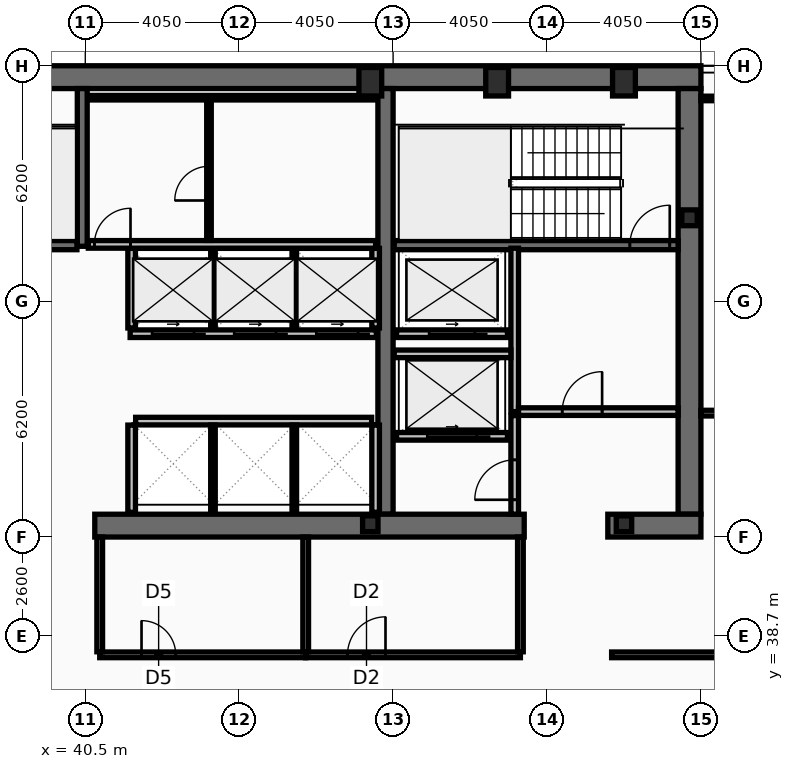
"""IFC4 building model, lengths in metres.
Left out: names, types, materials, properties, quantities, classifications, styles, units other than length and angle.
Written with IfcOpenShell. Run it as: python <this file> out.ifc"""

import sys

from ifc_helpers import new_model, si_unit, direction, frame, frame_2d, origin, origin_2d, place, context, subcontext, project, spatial, rectangle, hollow_rectangle, i_section, extrude, element, fill, save


model = new_model("IFC4")
c1 = context("Model", 3, precision=1e-05, world=origin(), true_north=direction((0.0, 1.0)))
c2 = subcontext(c1, "Body", "Model", "MODEL_VIEW")
j1 = project(units=[si_unit("LENGTHUNIT", "METRE"), si_unit("PLANEANGLEUNIT", "RADIAN")], contexts=[c1])
p1 = place(None, origin())
s1 = spatial("IfcSite", under=j1, at=p1, CompositionType="ELEMENT")
p2 = place(p1, origin())
s2 = spatial("IfcBuilding", under=s1, at=p2, CompositionType="ELEMENT")
p3 = place(p2, frame((0.0, 0.0, 210.2)))
s3 = spatial("IfcBuildingStorey", under=s2, at=p3, CompositionType="ELEMENT", Elevation=210.2)
p4 = place(p3, frame((16.2, 53.4, 0.0), z_axis=(0.0, 0.0, 1.0), x_axis=(1.0, 0.0, 0.0)))
e1 = element("IfcWall", 1, at=p4, inside=s3, PredefinedType="SHEAR", context=c2, shape_type="SweptSolid", body=[
    extrude(rectangle(XDim=40.5, YDim=0.6, at=frame_2d((20.25, 0.0))), origin(), (0.0, 0.0, 1.0), 3.44),
])
p5 = place(p3, frame((56.4, 53.1, 0.0), z_axis=(0.0, 0.0, 1.0), x_axis=(0.0, -1.0, 0.0)))
e2 = element("IfcWall", 2, at=p5, inside=s3, PredefinedType="SHEAR", context=c2, shape_type="SweptSolid", body=[
    extrude(rectangle(XDim=11.2, YDim=0.6, at=frame_2d((5.6, 0.0))), origin(), (0.0, 0.0, 1.0), 3.44),
])
p6 = place(p3, frame((48.4, 41.9, 0.0), z_axis=(0.0, 0.0, 1.0), x_axis=(0.0, 1.0, 0.0)))
e3 = element("IfcWall", 3, at=p6, inside=s3, PredefinedType="SHEAR", context=c2, shape_type="SweptSolid", body=[
    extrude(rectangle(XDim=11.2, YDim=0.4, at=frame_2d((5.6, 0.0))), origin(), (0.0, 0.0, 1.0), 3.44),
])
p7 = place(p3, frame((52.05, 41.6, 0.0), z_axis=(0.0, 0.0, 1.0), x_axis=(-1.0, 0.0, 0.0)))
e4 = element("IfcWall", 4, at=p7, inside=s3, PredefinedType="SHEAR", context=c2, shape_type="SweptSolid", body=[
    extrude(rectangle(XDim=11.3, YDim=0.6, at=frame_2d((5.65, 0.0))), origin(), (0.0, 0.0, 1.0), 3.44),
])
p8 = place(p3, frame((56.7, 41.6, 0.0), z_axis=(0.0, 0.0, 1.0), x_axis=(-1.0, 0.0, 0.0)))
e5 = element("IfcWall", 5, at=p8, inside=s3, PredefinedType="SHEAR", context=c2, shape_type="SweptSolid", body=[
    extrude(rectangle(XDim=2.45, YDim=0.6, at=frame_2d((1.225, 0.0))), origin(), (0.0, 0.0, 1.0), 3.44),
])
p9 = place(p3, frame((40.42, 48.95, 0.0), z_axis=(0.0, 0.0, 1.0), x_axis=(0.0, 1.0, 0.0)))
e6 = element("IfcWall", 6, at=p9, inside=s3, PredefinedType="SHEAR", context=c2, shape_type="SweptSolid", body=[
    extrude(rectangle(XDim=4.15, YDim=0.26, at=frame_2d((2.075, 0.0))), origin(), (0.0, 0.0, 1.0), 3.44),
])
p10 = place(p3, frame((48.63, 48.98, 0.0), z_axis=(0.0, 0.0, 1.0), x_axis=(1.0, 0.0, 0.0)))
e7 = element("IfcWall", 7, at=p10, inside=s3, PredefinedType="SHEAR", context=c2, shape_type="SweptSolid", body=[
    extrude(rectangle(XDim=7.47, YDim=0.24, at=frame_2d((3.735, 0.0))), origin(), (0.0, 0.0, 1.0), 3.44),
])
p11 = place(p10, frame((6.2, 0.0, 0.0)))
e8 = element("IfcOpeningElement", 8, at=p11, cuts=e7, PredefinedType="OPENING", context=c2, shape_type="SweptSolid", body=[
    extrude(rectangle(XDim=1.05, YDim=2.15, at=frame_2d((0.525, 1.075))), frame((0.0, 0.13, 0.0), z_axis=(0.0, -1.0, 0.0), x_axis=(1.0, 0.0, 0.0)), (0.0, 0.0, 1.0), 0.26),
])
p12 = place(p3, frame((32.72, 48.98, 0.0), z_axis=(0.0, 0.0, 1.0), x_axis=(1.0, 0.0, 0.0)))
e9 = element("IfcWall", 9, at=p12, inside=s3, PredefinedType="SHEAR", context=c2, shape_type="SweptSolid", body=[
    extrude(rectangle(XDim=7.56, YDim=0.24, at=frame_2d((3.78, 0.0))), origin(), (0.0, 0.0, 1.0), 3.44),
])
p13 = place(p12, frame((0.22, 0.0, 0.0)))
e10 = element("IfcOpeningElement", 10, at=p13, cuts=e9, PredefinedType="OPENING", context=c2, shape_type="SweptSolid", body=[
    extrude(rectangle(XDim=1.05, YDim=2.15, at=frame_2d((0.525, 1.075))), frame((0.0, 0.13, 0.0), z_axis=(0.0, -1.0, 0.0), x_axis=(1.0, 0.0, 0.0)), (0.0, 0.0, 1.0), 0.26),
])
for number, where, z_axis, x_axis in (
    (11, (48.0, 53.28, 0.0), (0.0, 0.0, 1.0), (1.0, 0.0, 0.0)),
    (12, (51.337, 53.28, 0.0), (0.0, 0.0, 1.0), (1.0, 0.0, 0.0)),
    (13, (54.675, 53.28, 0.0), (0.0, 0.0, 1.0), (1.0, 0.0, 0.0)),
):
    element("IfcColumn", number, at=place(p3, frame(where, z_axis=z_axis, x_axis=x_axis)), inside=s3, PredefinedType="COLUMN", context=c2, shape_type="SweptSolid", body=[
        extrude(hollow_rectangle(XDim=0.6, YDim=0.75, WallThickness=0.045, at=origin_2d()), origin(), (0.0, 0.0, 1.0), 3.6),
    ])
for number, where, z_axis, x_axis in (
    (14, (56.4, 49.7, 0.0), (0.0, 0.0, 1.0), (1.0, 0.0, 0.0)),
    (15, (48.0, 41.65, 0.0), (0.0, 0.0, 1.0), (1.0, 0.0, 0.0)),
    (16, (54.675, 41.65, 0.0), (0.0, 0.0, 1.0), (1.0, 0.0, 0.0)),
):
    element("IfcColumn", number, at=place(p3, frame(where, z_axis=z_axis, x_axis=x_axis)), inside=s3, PredefinedType="COLUMN", context=c2, shape_type="SweptSolid", body=[
        extrude(i_section(OverallWidth=0.406, OverallDepth=0.416, WebThickness=0.03, FlangeThickness=0.048, at=origin_2d()), origin(), (0.0, 0.0, 1.0), 3.6),
    ])
p14 = place(p3, frame((51.61, 43.95, 0.0), z_axis=(0.0, 0.0, 1.0), x_axis=(-1.0, 0.0, 0.0)))
e17 = element("IfcWall", 17, at=p14, inside=s3, PredefinedType="PARTITIONING", context=c2, shape_type="SweptSolid", body=[
    extrude(rectangle(XDim=2.92, YDim=0.2, at=frame_2d((1.46, 0.0))), origin(), (0.0, 0.0, 1.0), 3.44),
])
p15 = place(p14, frame((0.81, 0.0, 0.0)))
e18 = element("IfcOpeningElement", 18, at=p15, cuts=e17, PredefinedType="OPENING", context=c2, shape_type="SweptSolid", body=[
    extrude(rectangle(XDim=1.3, YDim=2.18, at=frame_2d((0.65, 1.09))), frame((0.0, 0.11, 0.0), z_axis=(0.0, -1.0, 0.0), x_axis=(1.0, 0.0, 0.0)), (0.0, 0.0, 1.0), 0.22),
])
p16 = place(p3, frame((51.61, 46.65, 0.0), z_axis=(0.0, 0.0, 1.0), x_axis=(-1.0, 0.0, 0.0)))
e19 = element("IfcWall", 19, at=p16, inside=s3, PredefinedType="PARTITIONING", context=c2, shape_type="SweptSolid", body=[
    extrude(rectangle(XDim=2.92, YDim=0.2, at=frame_2d((1.46, 0.0))), origin(), (0.0, 0.0, 1.0), 3.44),
])
p17 = place(p16, frame((0.86, 0.0, 0.0)))
e20 = element("IfcOpeningElement", 20, at=p17, cuts=e19, PredefinedType="OPENING", context=c2, shape_type="SweptSolid", body=[
    extrude(rectangle(XDim=1.2, YDim=2.18, at=frame_2d((0.6, 1.09))), frame((0.0, 0.11, 0.0), z_axis=(0.0, -1.0, 0.0), x_axis=(1.0, 0.0, 0.0)), (0.0, 0.0, 1.0), 0.22),
])
p18 = place(p3, frame((48.16, 46.65, 0.0), z_axis=(0.0, 0.0, 1.0), x_axis=(-1.0, 0.0, 0.0)))
e21 = element("IfcWall", 21, at=p18, inside=s3, PredefinedType="PARTITIONING", context=c2, shape_type="SweptSolid", body=[
    extrude(rectangle(XDim=6.48, YDim=0.2, at=frame_2d((3.24, 0.0))), origin(), (0.0, 0.0, 1.0), 3.44),
])
p19 = place(p18, frame((4.8, 0.0, 0.0)))
e22 = element("IfcOpeningElement", 22, at=p19, cuts=e21, PredefinedType="OPENING", context=c2, shape_type="SweptSolid", body=[
    extrude(rectangle(XDim=1.1, YDim=2.18, at=frame_2d((0.55, 1.09))), frame((0.0, 0.11, 0.0), z_axis=(0.0, -1.0, 0.0), x_axis=(1.0, 0.0, 0.0)), (0.0, 0.0, 1.0), 0.22),
])
p20 = place(p18, frame((2.64, 0.0, 0.0)))
e23 = element("IfcOpeningElement", 23, at=p20, cuts=e21, PredefinedType="OPENING", context=c2, shape_type="SweptSolid", body=[
    extrude(rectangle(XDim=1.1, YDim=2.18, at=frame_2d((0.55, 1.09))), frame((0.0, 0.11, 0.0), z_axis=(0.0, -1.0, 0.0), x_axis=(1.0, 0.0, 0.0)), (0.0, 0.0, 1.0), 0.22),
])
p21 = place(p18, frame((0.48, 0.0, 0.0)))
e24 = element("IfcOpeningElement", 24, at=p21, cuts=e21, PredefinedType="OPENING", context=c2, shape_type="SweptSolid", body=[
    extrude(rectangle(XDim=1.1, YDim=2.18, at=frame_2d((0.55, 1.09))), frame((0.0, 0.11, 0.0), z_axis=(0.0, -1.0, 0.0), x_axis=(1.0, 0.0, 0.0)), (0.0, 0.0, 1.0), 0.22),
])
p22 = place(p3, frame((51.8, 44.6, 0.0), z_axis=(0.0, 0.0, 1.0), x_axis=(0.0, 1.0, 0.0)))
e25 = element("IfcWall", 25, at=p22, inside=s3, PredefinedType="PARTITIONING", context=c2, shape_type="SweptSolid", body=[
    extrude(rectangle(XDim=4.3, YDim=0.2, at=frame_2d((2.15, 0.0))), origin(), (0.0, 0.0, 1.0), 3.44),
])
p23 = place(p3, frame((51.9, 44.6, 0.0), z_axis=(0.0, 0.0, 1.0), x_axis=(1.0, 0.0, 0.0)))
e26 = element("IfcWall", 26, at=p23, inside=s3, PredefinedType="PARTITIONING", context=c2, shape_type="SweptSolid", body=[
    extrude(rectangle(XDim=4.2, YDim=0.2, at=frame_2d((2.1, 0.0))), origin(), (0.0, 0.0, 1.0), 3.44),
])
p24 = place(p23, frame((1.15, 0.0, 0.0)))
e27 = element("IfcOpeningElement", 27, at=p24, cuts=e26, PredefinedType="OPENING", context=c2, shape_type="SweptSolid", body=[
    extrude(rectangle(XDim=1.05, YDim=2.15, at=frame_2d((0.525, 1.075))), frame((0.0, 0.11, 0.0), z_axis=(0.0, -1.0, 0.0), x_axis=(1.0, 0.0, 0.0)), (0.0, 0.0, 1.0), 0.22),
])
p25 = place(p3, frame((48.63, 46.12, 0.0), z_axis=(0.0, 0.0, 1.0), x_axis=(1.0, 0.0, 0.0)))
e28 = element("IfcWall", 28, at=p25, inside=s3, PredefinedType="PARTITIONING", context=c2, shape_type="SweptSolid", body=[
    extrude(rectangle(XDim=3.07, YDim=0.2, at=frame_2d((1.535, 0.0))), origin(), (0.0, 0.0, 1.0), 3.44),
])
p26 = place(p3, frame((51.8, 41.9, 0.0), z_axis=(0.0, 0.0, 1.0), x_axis=(0.0, 1.0, 0.0)))
e29 = element("IfcWall", 29, at=p26, inside=s3, PredefinedType="PARTITIONING", context=c2, shape_type="SweptSolid", body=[
    extrude(rectangle(XDim=2.595, YDim=0.2, at=frame_2d((1.298, 0.0))), origin(), (0.0, 0.0, 1.0), 3.44),
])
p27 = place(p26, frame((0.38, 0.0, 0.0)))
e30 = element("IfcOpeningElement", 30, at=p27, cuts=e29, PredefinedType="OPENING", context=c2, shape_type="SweptSolid", body=[
    extrude(rectangle(XDim=1.05, YDim=2.15, at=frame_2d((0.525, 1.075))), frame((0.0, 0.11, 0.0), z_axis=(0.0, -1.0, 0.0), x_axis=(1.0, 0.0, 0.0)), (0.0, 0.0, 1.0), 0.22),
])
for number, where, z_axis, x_axis in (
    (31, (41.72, 46.8, 0.0), (0.0, 0.0, 1.0), (0.0, 1.0, 0.0)),
    (32, (48.14, 46.8, 0.0), (0.0, 0.0, 1.0), (0.0, 1.0, 0.0)),
):
    element("IfcWall", number, at=place(p3, frame(where, z_axis=z_axis, x_axis=x_axis)), inside=s3, PredefinedType="PARTITIONING", context=c2, shape_type="SweptSolid", body=[
        extrude(rectangle(XDim=2.095, YDim=0.2, at=frame_2d((1.047, 0.0))), origin(), (0.0, 0.0, 1.0), 3.44),
    ])
for number, where, z_axis, x_axis in (
    (33, (43.86, 46.8, 0.0), (0.0, 0.0, 1.0), (0.0, 1.0, 0.0)),
    (34, (46.0, 46.8, 0.0), (0.0, 0.0, 1.0), (0.0, 1.0, 0.0)),
):
    element("IfcWall", number, at=place(p3, frame(where, z_axis=z_axis, x_axis=x_axis)), inside=s3, PredefinedType="PARTITIONING", context=c2, shape_type="SweptSolid", body=[
        extrude(rectangle(XDim=2.095, YDim=0.12, at=frame_2d((1.047, 0.0))), origin(), (0.0, 0.0, 1.0), 3.44),
    ])
p28 = place(p3, frame((41.825, 44.35, 0.0), z_axis=(0.0, 0.0, 1.0), x_axis=(1.0, 0.0, 0.0)))
e35 = element("IfcWall", 35, at=p28, inside=s3, PredefinedType="PARTITIONING", context=c2, shape_type="SweptSolid", body=[
    extrude(rectangle(XDim=6.21, YDim=0.2, at=frame_2d((3.105, 0.0))), origin(), (0.0, 0.0, 1.0), 3.44),
])
for number, where, z_axis, x_axis in (
    (36, (41.72, 41.95, 0.0), (0.0, 0.0, 1.0), (0.0, 1.0, 0.0)),
    (37, (48.14, 41.95, 0.0), (0.0, 0.0, 1.0), (0.0, 1.0, 0.0)),
):
    element("IfcWall", number, at=place(p3, frame(where, z_axis=z_axis, x_axis=x_axis)), inside=s3, PredefinedType="PARTITIONING", context=c2, shape_type="SweptSolid", body=[
        extrude(rectangle(XDim=2.295, YDim=0.2, at=frame_2d((1.147, 0.0))), origin(), (0.0, 0.0, 1.0), 3.44),
    ])
for number, where, z_axis, x_axis in (
    (38, (43.86, 41.95, 0.0), (0.0, 0.0, 1.0), (0.0, 1.0, 0.0)),
    (39, (46.0, 41.95, 0.0), (0.0, 0.0, 1.0), (0.0, 1.0, 0.0)),
):
    element("IfcWall", number, at=place(p3, frame(where, z_axis=z_axis, x_axis=x_axis)), inside=s3, PredefinedType="PARTITIONING", context=c2, shape_type="SweptSolid", body=[
        extrude(rectangle(XDim=2.295, YDim=0.12, at=frame_2d((1.147, 0.0))), origin(), (0.0, 0.0, 1.0), 3.44),
    ])
p29 = place(p3, frame((40.58, 52.86, 0.0), z_axis=(0.0, 0.0, 1.0), x_axis=(1.0, 0.0, 0.0)))
e40 = element("IfcWall", 40, at=p29, inside=s3, PredefinedType="PARTITIONING", context=c2, shape_type="SweptSolid", body=[
    extrude(rectangle(XDim=7.56, YDim=0.12, at=frame_2d((3.78, 0.0))), origin(), (0.0, 0.0, 1.0), 3.44),
])
p30 = place(p3, frame((40.58, 49.0, 0.0), z_axis=(0.0, 0.0, 1.0), x_axis=(1.0, 0.0, 0.0)))
e41 = element("IfcWall", 41, at=p30, inside=s3, PredefinedType="PARTITIONING", context=c2, shape_type="SweptSolid", body=[
    extrude(rectangle(XDim=7.56, YDim=0.2, at=frame_2d((3.78, 0.0))), origin(), (0.0, 0.0, 1.0), 3.44),
])
p31 = place(p30, frame((0.16, 0.0, 0.0)))
e42 = element("IfcOpeningElement", 42, at=p31, cuts=e41, PredefinedType="OPENING", context=c2, shape_type="SweptSolid", body=[
    extrude(rectangle(XDim=0.95, YDim=2.1, at=frame_2d((0.475, 1.05))), frame((0.0, 0.11, 0.0), z_axis=(0.0, -1.0, 0.0), x_axis=(1.0, 0.0, 0.0)), (0.0, 0.0, 1.0), 0.22),
])
p32 = place(p3, frame((43.755, 49.105, 0.0), z_axis=(0.0, 0.0, 1.0), x_axis=(0.0, 1.0, 0.0)))
e43 = element("IfcWall", 43, at=p32, inside=s3, PredefinedType="PARTITIONING", context=c2, shape_type="SweptSolid", body=[
    extrude(rectangle(XDim=3.69, YDim=0.12, at=frame_2d((1.845, 0.0))), origin(), (0.0, 0.0, 1.0), 3.44),
])
p33 = place(p32, frame((1.05, 0.0, 0.0)))
e44 = element("IfcOpeningElement", 44, at=p33, cuts=e43, PredefinedType="OPENING", context=c2, shape_type="SweptSolid", body=[
    extrude(rectangle(XDim=0.9, YDim=2.05, at=frame_2d((0.45, 1.025))), frame((0.0, 0.07, 0.0), z_axis=(0.0, -1.0, 0.0), x_axis=(1.0, 0.0, 0.0)), (0.0, 0.0, 1.0), 0.14),
])
p34 = place(p3, frame((40.88, 38.2, 0.0), z_axis=(0.0, 0.0, 1.0), x_axis=(1.0, 0.0, 0.0)))
e45 = element("IfcWall", 45, at=p34, inside=s3, PredefinedType="PARTITIONING", context=c2, shape_type="SweptSolid", body=[
    extrude(rectangle(XDim=5.42, YDim=0.15, at=frame_2d((2.71, 0.0))), origin(), (0.0, 0.0, 1.0), 2.73),
])
p35 = place(p34, frame((1.1, 0.0, 0.0)))
e46 = element("IfcOpeningElement", 46, at=p35, cuts=e45, PredefinedType="OPENING", context=c2, shape_type="SweptSolid", body=[
    extrude(rectangle(XDim=0.9, YDim=2.05, at=frame_2d((0.45, 1.025))), frame((0.0, 0.085, 0.0), z_axis=(0.0, -1.0, 0.0), x_axis=(1.0, 0.0, 0.0)), (0.0, 0.0, 1.0), 0.17),
])
p36 = place(p3, frame((46.3, 38.2, 0.0), z_axis=(0.0, 0.0, 1.0), x_axis=(1.0, 0.0, 0.0)))
e47 = element("IfcWall", 47, at=p36, inside=s3, PredefinedType="PARTITIONING", context=c2, shape_type="SweptSolid", body=[
    extrude(rectangle(XDim=5.65, YDim=0.15, at=frame_2d((2.825, 0.0))), origin(), (0.0, 0.0, 1.0), 2.73),
])
p37 = place(p36, frame((1.1, 0.0, 0.0)))
e48 = element("IfcOpeningElement", 48, at=p37, cuts=e47, PredefinedType="OPENING", context=c2, shape_type="SweptSolid", body=[
    extrude(rectangle(XDim=1.0, YDim=2.05, at=frame_2d((0.5, 1.025))), frame((0.0, 0.085, 0.0), z_axis=(0.0, -1.0, 0.0), x_axis=(1.0, 0.0, 0.0)), (0.0, 0.0, 1.0), 0.17),
])
for number, where, z_axis, x_axis in (
    (49, (40.88, 38.28, 0.0), (0.0, 0.0, 1.0), (0.0, 1.0, 0.0)),
    (50, (46.3, 38.28, 0.0), (0.0, 0.0, 1.0), (0.0, 1.0, 0.0)),
    (51, (51.95, 38.28, 0.0), (0.0, 0.0, 1.0), (0.0, 1.0, 0.0)),
):
    element("IfcWall", number, at=place(p3, frame(where, z_axis=z_axis, x_axis=x_axis)), inside=s3, PredefinedType="PARTITIONING", context=c2, shape_type="SweptSolid", body=[
        extrude(rectangle(XDim=3.02, YDim=0.15, at=frame_2d((1.51, 0.0))), origin(), (0.0, 0.0, 1.0), 3.44),
    ])
p38 = place(p3, frame((54.35, 38.2, 0.0), z_axis=(0.0, 0.0, 1.0), x_axis=(1.0, 0.0, 0.0)))
e52 = element("IfcWall", 52, at=p38, inside=s3, PredefinedType="PARTITIONING", context=c2, shape_type="SweptSolid", body=[
    extrude(rectangle(XDim=10.52, YDim=0.15, at=frame_2d((5.26, 0.0))), origin(), (0.0, 0.0, 1.0), 2.73),
])
p39 = place(p38, frame((3.25, 0.0, 0.0)))
e53 = element("IfcOpeningElement", 53, at=p39, cuts=e52, PredefinedType="OPENING", context=c2, shape_type="SweptSolid", body=[
    extrude(rectangle(XDim=0.95, YDim=2.05, at=frame_2d((0.475, 1.025))), frame((0.0, 0.085, 0.0), z_axis=(0.0, -1.0, 0.0), x_axis=(1.0, 0.0, 0.0)), (0.0, 0.0, 1.0), 0.17),
])
p40 = place(p3, frame((56.7, 44.56, 0.0), z_axis=(0.0, 0.0, 1.0), x_axis=(1.0, 0.0, 0.0)))
e54 = element("IfcWall", 54, at=p40, inside=s3, PredefinedType="PARTITIONING", context=c2, shape_type="SweptSolid", body=[
    extrude(rectangle(XDim=8.105, YDim=0.15, at=frame_2d((4.052, 0.0))), origin(), (0.0, 0.0, 1.0), 2.83),
])
p41 = place(p40, frame((0.9, 0.0, 0.0)))
e55 = element("IfcOpeningElement", 55, at=p41, cuts=e54, PredefinedType="OPENING", context=c2, shape_type="SweptSolid", body=[
    extrude(rectangle(XDim=0.9, YDim=2.05, at=frame_2d((0.45, 1.025))), frame((0.0, 0.085, 0.0), z_axis=(0.0, -1.0, 0.0), x_axis=(1.0, 0.0, 0.0)), (0.0, 0.0, 1.0), 0.17),
])
p42 = place(p3, frame((56.7, 52.84, 0.0), z_axis=(0.0, 0.0, 1.0), x_axis=(1.0, 0.0, 0.0)))
e56 = element("IfcWall", 56, at=p42, inside=s3, PredefinedType="PARTITIONING", context=c2, shape_type="SweptSolid", body=[
    extrude(rectangle(XDim=8.105, YDim=0.12, at=frame_2d((4.052, 0.0))), origin(), (0.0, 0.0, 1.0), 3.44),
])
p43 = place(p11, origin())
e57 = element("IfcDoor", 57, at=p43, inside=s3, OperationType="SINGLE_SWING_RIGHT", PredefinedType="DOOR", context=c2, shape_type="SweptSolid", body=[
    extrude(rectangle(XDim=1.05, YDim=2.15, at=frame_2d((0.525, 1.075))), frame((0.0, 0.025, 0.0), z_axis=(0.0, -1.0, 0.0), x_axis=(1.0, 0.0, 0.0)), (0.0, 0.0, 1.0), 0.05),
])
fill(e8, e57)
p44 = place(p15, origin())
e58 = element("IfcDoor", 58, at=p44, inside=s3, OperationType="SLIDING_TO_LEFT", PredefinedType="DOOR", context=c2, shape_type="SweptSolid", body=[
    extrude(rectangle(XDim=1.3, YDim=2.18, at=frame_2d((0.65, 1.09))), frame((0.0, 0.025, 0.0), z_axis=(0.0, -1.0, 0.0), x_axis=(1.0, 0.0, 0.0)), (0.0, 0.0, 1.0), 0.05),
])
fill(e18, e58)
p45 = place(p17, origin())
e59 = element("IfcDoor", 59, at=p45, inside=s3, OperationType="SLIDING_TO_LEFT", PredefinedType="DOOR", context=c2, shape_type="SweptSolid", body=[
    extrude(rectangle(XDim=1.2, YDim=2.18, at=frame_2d((0.6, 1.09))), frame((0.0, 0.025, 0.0), z_axis=(0.0, -1.0, 0.0), x_axis=(1.0, 0.0, 0.0)), (0.0, 0.0, 1.0), 0.05),
])
fill(e20, e59)
p46 = place(p19, origin())
e60 = element("IfcDoor", 60, at=p46, inside=s3, OperationType="SLIDING_TO_LEFT", PredefinedType="DOOR", context=c2, shape_type="SweptSolid", body=[
    extrude(rectangle(XDim=1.1, YDim=2.18, at=frame_2d((0.55, 1.09))), frame((0.0, 0.025, 0.0), z_axis=(0.0, -1.0, 0.0), x_axis=(1.0, 0.0, 0.0)), (0.0, 0.0, 1.0), 0.05),
])
fill(e22, e60)
p47 = place(p20, origin())
e61 = element("IfcDoor", 61, at=p47, inside=s3, OperationType="SLIDING_TO_LEFT", PredefinedType="DOOR", context=c2, shape_type="SweptSolid", body=[
    extrude(rectangle(XDim=1.1, YDim=2.18, at=frame_2d((0.55, 1.09))), frame((0.0, 0.025, 0.0), z_axis=(0.0, -1.0, 0.0), x_axis=(1.0, 0.0, 0.0)), (0.0, 0.0, 1.0), 0.05),
])
fill(e23, e61)
p48 = place(p21, origin())
e62 = element("IfcDoor", 62, at=p48, inside=s3, OperationType="SLIDING_TO_LEFT", PredefinedType="DOOR", context=c2, shape_type="SweptSolid", body=[
    extrude(rectangle(XDim=1.1, YDim=2.18, at=frame_2d((0.55, 1.09))), frame((0.0, 0.025, 0.0), z_axis=(0.0, -1.0, 0.0), x_axis=(1.0, 0.0, 0.0)), (0.0, 0.0, 1.0), 0.05),
])
fill(e24, e62)
p49 = place(p24, origin())
e63 = element("IfcDoor", 63, at=p49, inside=s3, OperationType="SINGLE_SWING_RIGHT", PredefinedType="DOOR", context=c2, shape_type="SweptSolid", body=[
    extrude(rectangle(XDim=1.05, YDim=2.15, at=frame_2d((0.525, 1.075))), frame((0.0, 0.025, 0.0), z_axis=(0.0, -1.0, 0.0), x_axis=(1.0, 0.0, 0.0)), (0.0, 0.0, 1.0), 0.05),
])
fill(e27, e63)
p50 = place(p27, origin())
e64 = element("IfcDoor", 64, at=p50, inside=s3, OperationType="SINGLE_SWING_LEFT", PredefinedType="DOOR", context=c2, shape_type="SweptSolid", body=[
    extrude(rectangle(XDim=1.05, YDim=2.15, at=frame_2d((0.525, 1.075))), frame((0.0, 0.025, 0.0), z_axis=(0.0, -1.0, 0.0), x_axis=(1.0, 0.0, 0.0)), (0.0, 0.0, 1.0), 0.05),
])
fill(e30, e64)
p51 = place(p31, origin())
e65 = element("IfcDoor", 65, at=p51, inside=s3, OperationType="SINGLE_SWING_RIGHT", PredefinedType="DOOR", context=c2, shape_type="SweptSolid", body=[
    extrude(rectangle(XDim=0.95, YDim=2.1, at=frame_2d((0.475, 1.05))), frame((0.0, 0.025, 0.0), z_axis=(0.0, -1.0, 0.0), x_axis=(1.0, 0.0, 0.0)), (0.0, 0.0, 1.0), 0.05),
])
fill(e42, e65)
p52 = place(p33, origin())
e66 = element("IfcDoor", 66, at=p52, inside=s3, OperationType="SINGLE_SWING_LEFT", PredefinedType="DOOR", context=c2, shape_type="SweptSolid", body=[
    extrude(rectangle(XDim=0.9, YDim=2.05, at=frame_2d((0.45, 1.025))), frame((0.0, 0.025, 0.0), z_axis=(0.0, -1.0, 0.0), x_axis=(1.0, 0.0, 0.0)), (0.0, 0.0, 1.0), 0.05),
])
fill(e44, e66)
p53 = place(p35, origin())
e67 = element("IfcDoor", 67, at=p53, inside=s3, OperationType="SINGLE_SWING_LEFT", PredefinedType="DOOR", context=c2, shape_type="SweptSolid", body=[
    extrude(rectangle(XDim=0.9, YDim=2.05, at=frame_2d((0.45, 1.025))), frame((0.0, 0.025, 0.0), z_axis=(0.0, -1.0, 0.0), x_axis=(1.0, 0.0, 0.0)), (0.0, 0.0, 1.0), 0.05),
])
fill(e46, e67)
p54 = place(p37, origin())
e68 = element("IfcDoor", 68, at=p54, inside=s3, OperationType="SINGLE_SWING_RIGHT", PredefinedType="DOOR", context=c2, shape_type="SweptSolid", body=[
    extrude(rectangle(XDim=1.0, YDim=2.05, at=frame_2d((0.5, 1.025))), frame((0.0, 0.025, 0.0), z_axis=(0.0, -1.0, 0.0), x_axis=(1.0, 0.0, 0.0)), (0.0, 0.0, 1.0), 0.05),
])
fill(e48, e68)
save(model, sys.argv[1])
